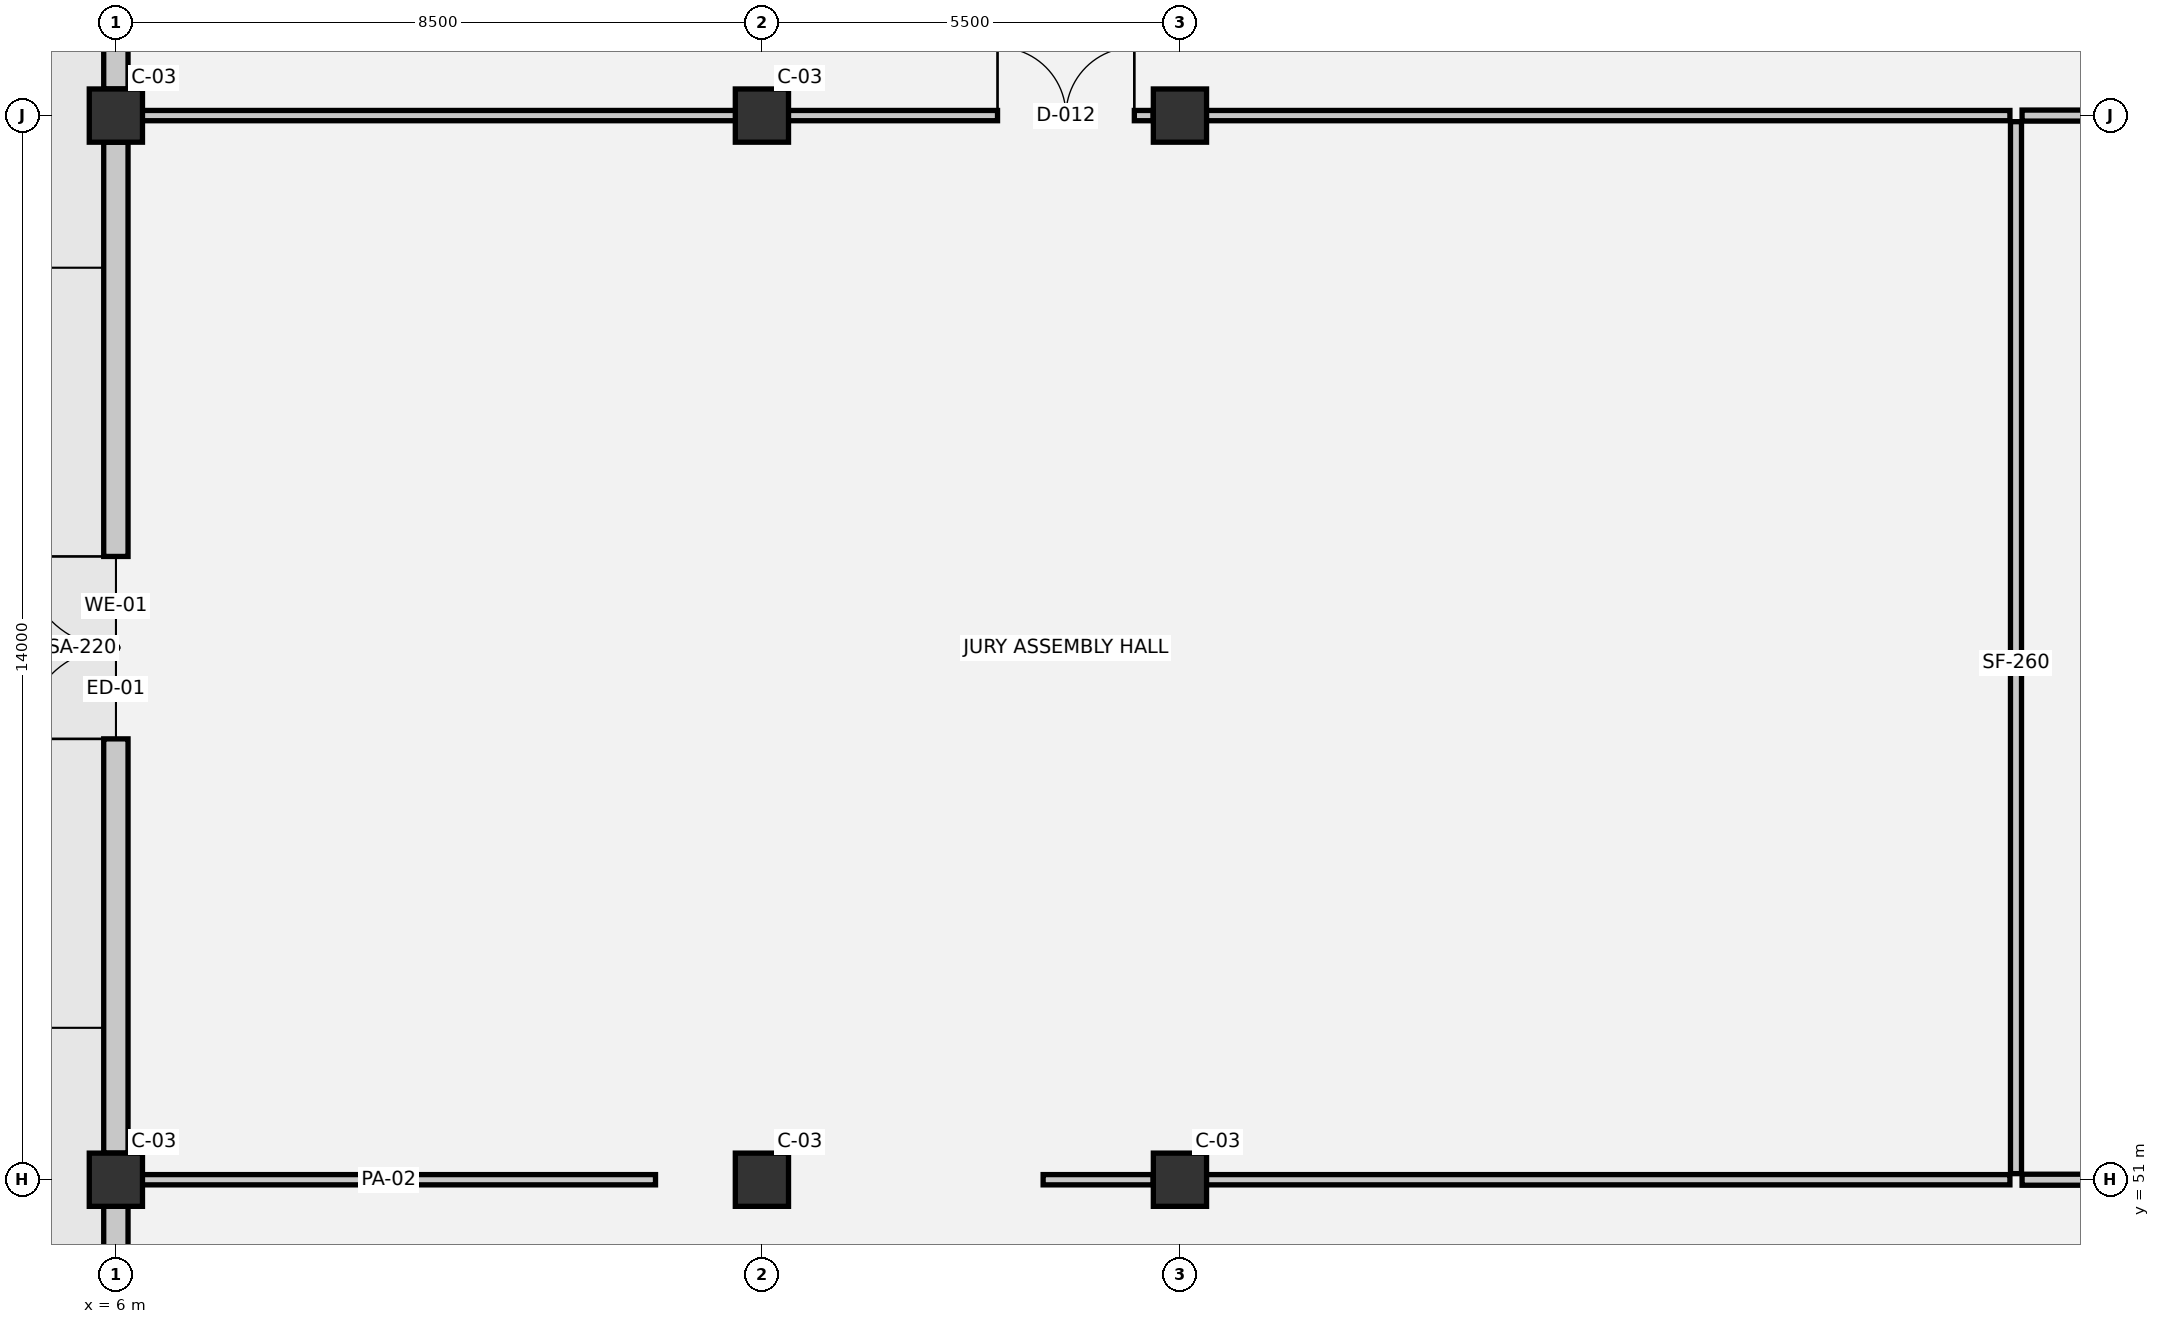
"""IFC4 building model, lengths in metres.
Left out: names, types, materials, properties, quantities, classifications, styles, units other than length and angle.
Written with IfcOpenShell. Run it as: python <this file> out.ifc"""

import sys

from ifc_helpers import new_model, si_unit, direction, frame, frame_2d, origin, origin_2d, place, context, subcontext, project, spatial, rectangle, extrude, element, fill, save


model = new_model("IFC4")
c1 = context("Model", 3, precision=1e-05, world=origin(), true_north=direction((0.0, 1.0)))
c2 = subcontext(c1, "Body", "Model", "MODEL_VIEW")
j1 = project(units=[si_unit("LENGTHUNIT", "METRE"), si_unit("PLANEANGLEUNIT", "RADIAN")], contexts=[c1])
p1 = place(None, origin())
s1 = spatial("IfcSite", under=j1, at=p1, CompositionType="ELEMENT")
p2 = place(p1, origin())
s2 = spatial("IfcBuilding", under=s1, at=p2, CompositionType="ELEMENT")
p3 = place(p2, origin())
s3 = spatial("IfcBuildingStorey", under=s2, at=p3, CompositionType="ELEMENT", Elevation=0.0)
for number, where, z_axis, x_axis in (
    (1, (6.0, 51.0, 0.0), (0.0, 0.0, 1.0), (1.0, 0.0, 0.0)),
    (2, (6.0, 65.0, 0.0), (0.0, 0.0, 1.0), (1.0, 0.0, 0.0)),
    (3, (14.5, 51.0, 0.0), (0.0, 0.0, 1.0), (1.0, 0.0, 0.0)),
    (4, (14.5, 65.0, 0.0), (0.0, 0.0, 1.0), (1.0, 0.0, 0.0)),
    (5, (20.0, 51.0, 0.0), (0.0, 0.0, 1.0), (1.0, 0.0, 0.0)),
    (6, (20.0, 65.0, 0.0), (0.0, 0.0, 1.0), (1.0, 0.0, 0.0)),
):
    element("IfcColumn", number, at=place(p3, frame(where, z_axis=z_axis, x_axis=x_axis)), inside=s3, PredefinedType="COLUMN", context=c2, shape_type="SweptSolid", body=[
        extrude(rectangle(XDim=0.7, YDim=0.7, at=origin_2d()), origin(), (0.0, 0.0, 1.0), 5.4),
    ])
p4 = place(p3, frame((6.0, 44.35, 0.0), z_axis=(0.0, 0.0, 1.0), x_axis=(0.0, 1.0, 0.0)))
e7 = element("IfcWall", 7, at=p4, inside=s3, PredefinedType="SOLIDWALL", context=c2, shape_type="SweptSolid", body=[
    extrude(rectangle(XDim=6.3, YDim=0.32, at=frame_2d((3.15, 0.0))), origin(), (0.0, 0.0, 1.0), 4.01),
])
p5 = place(p4, frame((1.63, 0.0, 0.9)))
e8 = element("IfcOpeningElement", 8, at=p5, cuts=e7, PredefinedType="OPENING", context=c2, shape_type="SweptSolid", body=[
    extrude(rectangle(XDim=2.0, YDim=2.2, at=frame_2d((1.0, 1.1))), frame((0.0, 0.17, 0.0), z_axis=(0.0, -1.0, 0.0), x_axis=(1.0, 0.0, 0.0)), (0.0, 0.0, 1.0), 0.34),
])
p6 = place(p3, frame((6.0, 51.35, 0.0), z_axis=(0.0, 0.0, 1.0), x_axis=(0.0, 1.0, 0.0)))
e9 = element("IfcWall", 9, at=p6, inside=s3, PredefinedType="SOLIDWALL", context=c2, shape_type="SweptSolid", body=[
    extrude(rectangle(XDim=13.3, YDim=0.32, at=frame_2d((6.65, 0.0))), origin(), (0.0, 0.0, 1.0), 4.01),
])
p7 = place(p6, frame((5.45, 0.0, 0.0)))
e10 = element("IfcOpeningElement", 10, at=p7, cuts=e9, PredefinedType="OPENING", context=c2, shape_type="SweptSolid", body=[
    extrude(rectangle(XDim=2.4, YDim=2.4, at=frame_2d((1.2, 1.2))), frame((0.0, 0.17, 0.0), z_axis=(0.0, -1.0, 0.0), x_axis=(1.0, 0.0, 0.0)), (0.0, 0.0, 1.0), 0.34),
])
p8 = place(p3, frame((6.0, 65.35, 0.0), z_axis=(0.0, 0.0, 1.0), x_axis=(0.0, 1.0, 0.0)))
e11 = element("IfcWall", 11, at=p8, inside=s3, PredefinedType="SOLIDWALL", context=c2, shape_type="SweptSolid", body=[
    extrude(rectangle(XDim=6.3, YDim=0.32, at=frame_2d((3.15, 0.0))), origin(), (0.0, 0.0, 1.0), 4.01),
])
p9 = place(p8, frame((2.05, 0.0, 0.0)))
e12 = element("IfcOpeningElement", 12, at=p9, cuts=e11, PredefinedType="OPENING", context=c2, shape_type="SweptSolid", body=[
    extrude(rectangle(XDim=2.2, YDim=2.4, at=frame_2d((1.1, 1.2))), frame((0.0, 0.17, 0.0), z_axis=(0.0, -1.0, 0.0), x_axis=(1.0, 0.0, 0.0)), (0.0, 0.0, 1.0), 0.34),
])
p10 = place(p3, frame((6.08, 51.0, 0.0), z_axis=(0.0, 0.0, 1.0), x_axis=(1.0, 0.0, 0.0)))
e13 = element("IfcWall", 13, at=p10, inside=s3, PredefinedType="PARTITIONING", context=c2, shape_type="SweptSolid", body=[
    extrude(rectangle(XDim=7.02, YDim=0.135, at=frame_2d((3.51, 0.0))), origin(), (0.0, 0.0, 1.0), 4.43),
])
p11 = place(p3, frame((18.2, 51.0, 0.0), z_axis=(0.0, 0.0, 1.0), x_axis=(1.0, 0.0, 0.0)))
e14 = element("IfcWall", 14, at=p11, inside=s3, PredefinedType="PARTITIONING", context=c2, shape_type="SweptSolid", body=[
    extrude(rectangle(XDim=1.45, YDim=0.135, at=frame_2d((0.725, 0.0))), origin(), (0.0, 0.0, 1.0), 4.43),
])
p12 = place(p3, frame((19.65, 51.0, 0.0), z_axis=(0.0, 0.0, 1.0), x_axis=(1.0, 0.0, 0.0)))
e15 = element("IfcWall", 15, at=p12, inside=s3, PredefinedType="PARTITIONING", context=c2, shape_type="SweptSolid", body=[
    extrude(rectangle(XDim=11.27, YDim=0.135, at=frame_2d((5.635, 0.0))), origin(), (0.0, 0.0, 1.0), 4.18),
])
p13 = place(p3, frame((31.08, 51.0, 0.0), z_axis=(0.0, 0.0, 1.0), x_axis=(1.0, 0.0, 0.0)))
e16 = element("IfcWall", 16, at=p13, inside=s3, PredefinedType="PARTITIONING", context=c2, shape_type="SweptSolid", body=[
    extrude(rectangle(XDim=19.27, YDim=0.145, at=frame_2d((9.635, 0.0))), origin(), (0.0, 0.0, 1.0), 4.18),
])
p14 = place(p13, frame((10.22, 0.0, 0.0)))
e17 = element("IfcOpeningElement", 17, at=p14, cuts=e16, PredefinedType="OPENING", context=c2, shape_type="SweptSolid", body=[
    extrude(rectangle(XDim=1.8, YDim=2.3, at=frame_2d((0.9, 1.15))), frame((0.0, 0.083, 0.0), z_axis=(0.0, -1.0, 0.0), x_axis=(1.0, 0.0, 0.0)), (0.0, 0.0, 1.0), 0.165),
])
p15 = place(p3, frame((6.08, 65.0, 0.0), z_axis=(0.0, 0.0, 1.0), x_axis=(1.0, 0.0, 0.0)))
e18 = element("IfcWall", 18, at=p15, inside=s3, PredefinedType="PARTITIONING", context=c2, shape_type="SweptSolid", body=[
    extrude(rectangle(XDim=13.57, YDim=0.135, at=frame_2d((6.785, 0.0))), origin(), (0.0, 0.0, 1.0), 4.43),
])
p16 = place(p15, frame((11.52, 0.0, 0.0)))
e19 = element("IfcOpeningElement", 19, at=p16, cuts=e18, PredefinedType="OPENING", context=c2, shape_type="SweptSolid", body=[
    extrude(rectangle(XDim=1.8, YDim=2.3, at=frame_2d((0.9, 1.15))), frame((0.0, 0.077, 0.0), z_axis=(0.0, -1.0, 0.0), x_axis=(1.0, 0.0, 0.0)), (0.0, 0.0, 1.0), 0.155),
])
p17 = place(p3, frame((19.65, 65.0, 0.0), z_axis=(0.0, 0.0, 1.0), x_axis=(1.0, 0.0, 0.0)))
e20 = element("IfcWall", 20, at=p17, inside=s3, PredefinedType="PARTITIONING", context=c2, shape_type="SweptSolid", body=[
    extrude(rectangle(XDim=11.27, YDim=0.135, at=frame_2d((5.635, 0.0))), origin(), (0.0, 0.0, 1.0), 4.18),
])
p18 = place(p3, frame((31.08, 65.0, 0.0), z_axis=(0.0, 0.0, 1.0), x_axis=(1.0, 0.0, 0.0)))
e21 = element("IfcWall", 21, at=p18, inside=s3, PredefinedType="PARTITIONING", context=c2, shape_type="SweptSolid", body=[
    extrude(rectangle(XDim=19.27, YDim=0.145, at=frame_2d((9.635, 0.0))), origin(), (0.0, 0.0, 1.0), 4.18),
])
p19 = place(p3, frame((31.0, 51.08, 0.0), z_axis=(0.0, 0.0, 1.0), x_axis=(0.0, 1.0, 0.0)))
e22 = element("IfcWall", 22, at=p19, inside=s3, PredefinedType="PARTITIONING", context=c2, shape_type="SweptSolid", body=[
    extrude(rectangle(XDim=13.84, YDim=0.145, at=frame_2d((6.92, 0.0))), origin(), (0.0, 0.0, 1.0), 5.04),
])
p20 = place(p7, origin())
e23 = element("IfcDoor", 23, at=p20, inside=s3, OperationType="DOUBLE_DOOR_SINGLE_SWING", PredefinedType="DOOR", context=c2, shape_type="SweptSolid", body=[
    extrude(rectangle(XDim=2.4, YDim=2.4, at=frame_2d((1.2, 1.2))), frame((0.0, 0.025, 0.0), z_axis=(0.0, -1.0, 0.0), x_axis=(1.0, 0.0, 0.0)), (0.0, 0.0, 1.0), 0.05),
])
fill(e10, e23)
p21 = place(p16, origin())
e24 = element("IfcDoor", 24, at=p21, inside=s3, OperationType="DOUBLE_DOOR_SINGLE_SWING", PredefinedType="DOOR", context=c2, shape_type="SweptSolid", body=[
    extrude(rectangle(XDim=1.8, YDim=2.3, at=frame_2d((0.9, 1.15))), frame((0.0, 0.025, 0.0), z_axis=(0.0, -1.0, 0.0), x_axis=(1.0, 0.0, 0.0)), (0.0, 0.0, 1.0), 0.05),
])
fill(e19, e24)
save(model, sys.argv[1])
